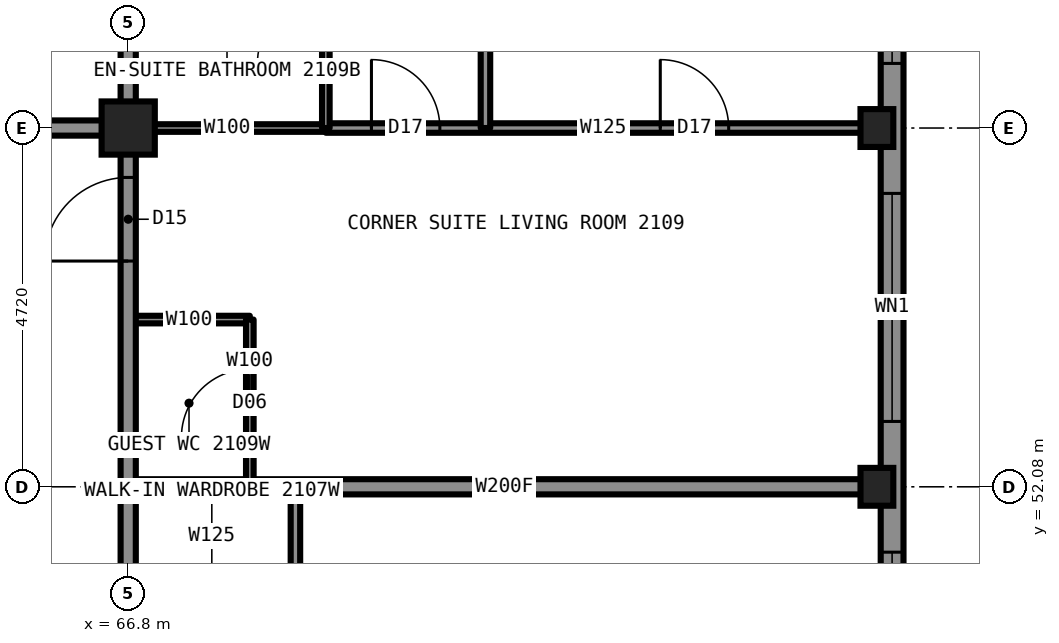
"""IFC4 building model, lengths in metres.
Left out: names, types, materials, properties, quantities, classifications, styles, units other than length and angle.
Written with IfcOpenShell. Run it as: python <this file> out.ifc"""

import sys

from ifc_helpers import new_model, si_unit, direction, frame, frame_2d, origin, origin_2d, place, context, subcontext, project, spatial, rectangle, hollow_rectangle, i_section, extrude, element, fill, save


model = new_model("IFC4")
c1 = context("Model", 3, precision=1e-05, world=origin(), true_north=direction((0.0, 1.0)))
c2 = subcontext(c1, "Body", "Model", "MODEL_VIEW")
j1 = project(units=[si_unit("LENGTHUNIT", "METRE"), si_unit("PLANEANGLEUNIT", "RADIAN")], contexts=[c1])
p1 = place(None, origin())
s1 = spatial("IfcSite", under=j1, at=p1, CompositionType="ELEMENT")
p2 = place(p1, origin())
s2 = spatial("IfcBuilding", under=s1, at=p2, CompositionType="ELEMENT")
p3 = place(p2, frame((0.0, 0.0, 81.0)))
s3 = spatial("IfcBuildingStorey", under=s2, at=p3, CompositionType="ELEMENT", Elevation=81.0)
for number, where, z_axis, x_axis in (
    (1, (76.65, 52.08, 0.0), (0.0, 0.0, 1.0), (1.0, 0.0, 0.0)),
    (2, (76.65, 56.8, 0.0), (0.0, 0.0, 1.0), (1.0, 0.0, 0.0)),
):
    element("IfcColumn", number, at=place(p3, frame(where, z_axis=z_axis, x_axis=x_axis)), inside=s3, PredefinedType="COLUMN", context=c2, shape_type="SweptSolid", body=[
        extrude(i_section(OverallWidth=0.432, OverallDepth=0.498, WebThickness=0.056, FlangeThickness=0.089, at=origin_2d()), origin(), (0.0, 0.0, 1.0), 3.5),
    ])
p4 = place(p3, frame((66.8, 56.8, 0.0), z_axis=(0.0, 0.0, 1.0), x_axis=(1.0, 0.0, 0.0)))
e3 = element("IfcColumn", 3, at=p4, inside=s3, PredefinedType="COLUMN", context=c2, shape_type="SweptSolid", body=[
    extrude(hollow_rectangle(XDim=0.7, YDim=0.7, WallThickness=0.06, at=origin_2d()), origin(), (0.0, 0.0, 1.0), 3.5),
])
p5 = place(p3, frame((66.8, 56.8, 0.0), z_axis=(0.0, 0.0, 1.0), x_axis=(1.0, 0.0, 0.0)))
e4 = element("IfcWall", 4, at=p5, inside=s3, PredefinedType="PARTITIONING", context=c2, shape_type="SweptSolid", body=[
    extrude(rectangle(XDim=2.6, YDim=0.1, at=frame_2d((1.3, 0.0))), origin(), (0.0, 0.0, 1.0), 2.573),
])
p6 = place(p3, frame((43.2, 56.8, 0.0), z_axis=(0.0, 0.0, 1.0), x_axis=(1.0, 0.0, 0.0)))
e5 = element("IfcWall", 5, at=p6, inside=s3, PredefinedType="PARTITIONING", context=c2, shape_type="SweptSolid", body=[
    extrude(rectangle(XDim=23.6, YDim=0.2, at=frame_2d((11.8, 0.0))), origin(), (0.0, 0.0, 1.0), 3.33),
])
p7 = place(p6, frame((0.7, 0.0, 0.0)))
e6 = element("IfcOpeningElement", 6, at=p7, cuts=e5, PredefinedType="OPENING", context=c2, shape_type="SweptSolid", body=[
    extrude(rectangle(XDim=1.0, YDim=2.2, at=frame_2d((0.5, 1.1))), frame((0.0, 0.11, 0.0), z_axis=(0.0, -1.0, 0.0), x_axis=(1.0, 0.0, 0.0)), (0.0, 0.0, 1.0), 0.22),
])
p8 = place(p6, frame((6.98, 0.0, 0.0)))
e7 = element("IfcOpeningElement", 7, at=p8, cuts=e5, PredefinedType="OPENING", context=c2, shape_type="SweptSolid", body=[
    extrude(rectangle(XDim=1.0, YDim=2.2, at=frame_2d((0.5, 1.1))), frame((0.0, 0.11, 0.0), z_axis=(0.0, -1.0, 0.0), x_axis=(1.0, 0.0, 0.0)), (0.0, 0.0, 1.0), 0.22),
])
p9 = place(p6, frame((11.29, 0.0, 0.0)))
e8 = element("IfcOpeningElement", 8, at=p9, cuts=e5, PredefinedType="OPENING", context=c2, shape_type="SweptSolid", body=[
    extrude(rectangle(XDim=1.1, YDim=2.2, at=frame_2d((0.55, 1.1))), frame((0.0, 0.11, 0.0), z_axis=(0.0, -1.0, 0.0), x_axis=(1.0, 0.0, 0.0)), (0.0, 0.0, 1.0), 0.22),
])
p10 = place(p3, frame((69.4, 56.8, 0.0), z_axis=(0.0, 0.0, 1.0), x_axis=(1.0, 0.0, 0.0)))
e9 = element("IfcWall", 9, at=p10, inside=s3, PredefinedType="PARTITIONING", context=c2, shape_type="SweptSolid", body=[
    extrude(rectangle(XDim=7.3, YDim=0.125, at=frame_2d((3.65, 0.0))), origin(), (0.0, 0.0, 1.0), 2.573),
])
p11 = place(p10, frame((0.6, 0.0, 0.0)))
e10 = element("IfcOpeningElement", 10, at=p11, cuts=e9, PredefinedType="OPENING", context=c2, shape_type="SweptSolid", body=[
    extrude(rectangle(XDim=0.9, YDim=2.2, at=frame_2d((0.45, 1.1))), frame((0.0, 0.073, 0.0), z_axis=(0.0, -1.0, 0.0), x_axis=(1.0, 0.0, 0.0)), (0.0, 0.0, 1.0), 0.145),
])
p12 = place(p10, frame((4.4, 0.0, 0.0)))
e11 = element("IfcOpeningElement", 11, at=p12, cuts=e9, PredefinedType="OPENING", context=c2, shape_type="SweptSolid", body=[
    extrude(rectangle(XDim=0.9, YDim=2.2, at=frame_2d((0.45, 1.1))), frame((0.0, 0.073, 0.0), z_axis=(0.0, -1.0, 0.0), x_axis=(1.0, 0.0, 0.0)), (0.0, 0.0, 1.0), 0.145),
])
p13 = place(p3, frame((66.8, 52.08, 0.0), z_axis=(0.0, 0.0, 1.0), x_axis=(1.0, 0.0, 0.0)))
e12 = element("IfcWall", 12, at=p13, inside=s3, PredefinedType="PARTITIONING", context=c2, shape_type="SweptSolid", body=[
    extrude(rectangle(XDim=9.9, YDim=0.2, at=frame_2d((4.95, 0.0))), origin(), (0.0, 0.0, 1.0), 2.573),
])
p14 = place(p3, frame((66.8, 54.28, 0.0), z_axis=(0.0, 0.0, 1.0), x_axis=(1.0, 0.0, 0.0)))
e13 = element("IfcWall", 13, at=p14, inside=s3, PredefinedType="PARTITIONING", context=c2, shape_type="SweptSolid", body=[
    extrude(rectangle(XDim=1.6, YDim=0.1, at=frame_2d((0.8, 0.0))), origin(), (0.0, 0.0, 1.0), 2.723),
])
p15 = place(p3, frame((66.8, 33.2, 0.0), z_axis=(0.0, 0.0, 1.0), x_axis=(0.0, 1.0, 0.0)))
e14 = element("IfcWall", 14, at=p15, inside=s3, PredefinedType="PARTITIONING", context=c2, shape_type="SweptSolid", body=[
    extrude(rectangle(XDim=23.6, YDim=0.2, at=frame_2d((11.8, 0.0))), origin(), (0.0, 0.0, 1.0), 3.33),
])
p16 = place(p15, frame((7.72, 0.0, 0.0)))
e15 = element("IfcOpeningElement", 15, at=p16, cuts=e14, PredefinedType="OPENING", context=c2, shape_type="SweptSolid", body=[
    extrude(rectangle(XDim=1.0, YDim=2.2, at=frame_2d((0.5, 1.1))), frame((0.0, 0.11, 0.0), z_axis=(0.0, -1.0, 0.0), x_axis=(1.0, 0.0, 0.0)), (0.0, 0.0, 1.0), 0.22),
])
p17 = place(p15, frame((16.42, 0.0, 0.0)))
e16 = element("IfcOpeningElement", 16, at=p17, cuts=e14, PredefinedType="OPENING", context=c2, shape_type="SweptSolid", body=[
    extrude(rectangle(XDim=1.0, YDim=2.2, at=frame_2d((0.5, 1.1))), frame((0.0, 0.11, 0.0), z_axis=(0.0, -1.0, 0.0), x_axis=(1.0, 0.0, 0.0)), (0.0, 0.0, 1.0), 0.22),
])
p18 = place(p15, frame((21.85, 0.0, 0.0)))
e17 = element("IfcOpeningElement", 17, at=p18, cuts=e14, PredefinedType="OPENING", context=c2, shape_type="SweptSolid", body=[
    extrude(rectangle(XDim=1.1, YDim=2.2, at=frame_2d((0.55, 1.1))), frame((0.0, 0.11, 0.0), z_axis=(0.0, -1.0, 0.0), x_axis=(1.0, 0.0, 0.0)), (0.0, 0.0, 1.0), 0.22),
])
p19 = place(p15, frame((0.66, 0.0, 0.0)))
e18 = element("IfcOpeningElement", 18, at=p19, cuts=e14, PredefinedType="OPENING", context=c2, shape_type="SweptSolid", body=[
    extrude(rectangle(XDim=1.1, YDim=2.2, at=frame_2d((0.55, 1.1))), frame((0.0, 0.11, 0.0), z_axis=(0.0, -1.0, 0.0), x_axis=(1.0, 0.0, 0.0)), (0.0, 0.0, 1.0), 0.22),
])
p20 = place(p3, frame((66.8, 56.8, 0.0), z_axis=(0.0, 0.0, 1.0), x_axis=(0.0, 1.0, 0.0)))
e19 = element("IfcWall", 19, at=p20, inside=s3, PredefinedType="PARTITIONING", context=c2, shape_type="SweptSolid", body=[
    extrude(rectangle(XDim=9.9, YDim=0.2, at=frame_2d((4.95, 0.0))), origin(), (0.0, 0.0, 1.0), 2.573),
])
p21 = place(p3, frame((68.4, 52.08, 0.0), z_axis=(0.0, 0.0, 1.0), x_axis=(0.0, 1.0, 0.0)))
e20 = element("IfcWall", 20, at=p21, inside=s3, PredefinedType="PARTITIONING", context=c2, shape_type="SweptSolid", body=[
    extrude(rectangle(XDim=2.2, YDim=0.1, at=frame_2d((1.1, 0.0))), origin(), (0.0, 0.0, 1.0), 3.33),
])
p22 = place(p21, frame((0.65, 0.0, 0.0)))
e21 = element("IfcOpeningElement", 21, at=p22, cuts=e20, PredefinedType="OPENING", context=c2, shape_type="SweptSolid", body=[
    extrude(rectangle(XDim=0.9, YDim=2.1, at=frame_2d((0.45, 1.05))), frame((0.0, 0.06, 0.0), z_axis=(0.0, -1.0, 0.0), x_axis=(1.0, 0.0, 0.0)), (0.0, 0.0, 1.0), 0.12),
])
p23 = place(p3, frame((69.0, 50.88, 0.0), z_axis=(0.0, 0.0, 1.0), x_axis=(0.0, 1.0, 0.0)))
e22 = element("IfcWall", 22, at=p23, inside=s3, PredefinedType="PARTITIONING", context=c2, shape_type="SweptSolid", body=[
    extrude(rectangle(XDim=1.2, YDim=0.125, at=frame_2d((0.6, 0.0))), origin(), (0.0, 0.0, 1.0), 3.33),
])
p24 = place(p3, frame((69.4, 56.8, 0.0), z_axis=(0.0, 0.0, 1.0), x_axis=(0.0, 1.0, 0.0)))
e23 = element("IfcWall", 23, at=p24, inside=s3, PredefinedType="PARTITIONING", context=c2, shape_type="SweptSolid", body=[
    extrude(rectangle(XDim=2.6, YDim=0.1, at=frame_2d((1.3, 0.0))), origin(), (0.0, 0.0, 1.0), 3.33),
])
p25 = place(p24, frame((0.85, 0.0, 0.0)))
e24 = element("IfcOpeningElement", 24, at=p25, cuts=e23, PredefinedType="OPENING", context=c2, shape_type="SweptSolid", body=[
    extrude(rectangle(XDim=0.9, YDim=2.1, at=frame_2d((0.45, 1.05))), frame((0.0, 0.06, 0.0), z_axis=(0.0, -1.0, 0.0), x_axis=(1.0, 0.0, 0.0)), (0.0, 0.0, 1.0), 0.12),
])
p26 = place(p3, frame((71.5, 56.8, 0.0), z_axis=(0.0, 0.0, 1.0), x_axis=(0.0, 1.0, 0.0)))
e25 = element("IfcWall", 25, at=p26, inside=s3, PredefinedType="PARTITIONING", context=c2, shape_type="SweptSolid", body=[
    extrude(rectangle(XDim=9.894, YDim=0.125, at=frame_2d((4.947, 0.0))), origin(), (0.0, 0.0, 1.0), 3.33),
])
p27 = place(p3, frame((76.85, 28.5, 0.0), z_axis=(0.0, 0.0, 1.0), x_axis=(0.0, 1.0, 0.0)))
e26 = element("IfcWall", 26, at=p27, inside=s3, PredefinedType="SOLIDWALL", context=c2, shape_type="SweptSolid", body=[
    extrude(rectangle(XDim=33.0, YDim=0.3, at=frame_2d((16.5, 0.0))), origin(), (0.0, 0.0, 1.0), 2.63),
])
p28 = place(p27, frame((0.85, 0.0, 0.5)))
e27 = element("IfcOpeningElement", 27, at=p28, cuts=e26, PredefinedType="OPENING", context=c2, shape_type="SweptSolid", body=[
    extrude(rectangle(XDim=3.0, YDim=2.0, at=frame_2d((1.5, 1.0))), frame((0.0, 0.16, 0.0), z_axis=(0.0, -1.0, 0.0), x_axis=(1.0, 0.0, 0.0)), (0.0, 0.0, 1.0), 0.32),
])
p29 = place(p27, frame((5.56, 0.0, 0.5)))
e28 = element("IfcOpeningElement", 28, at=p29, cuts=e26, PredefinedType="OPENING", context=c2, shape_type="SweptSolid", body=[
    extrude(rectangle(XDim=3.0, YDim=2.0, at=frame_2d((1.5, 1.0))), frame((0.0, 0.16, 0.0), z_axis=(0.0, -1.0, 0.0), x_axis=(1.0, 0.0, 0.0)), (0.0, 0.0, 1.0), 0.32),
])
p30 = place(p27, frame((10.28, 0.0, 0.5)))
e29 = element("IfcOpeningElement", 29, at=p30, cuts=e26, PredefinedType="OPENING", context=c2, shape_type="SweptSolid", body=[
    extrude(rectangle(XDim=3.0, YDim=2.0, at=frame_2d((1.5, 1.0))), frame((0.0, 0.16, 0.0), z_axis=(0.0, -1.0, 0.0), x_axis=(1.0, 0.0, 0.0)), (0.0, 0.0, 1.0), 0.32),
])
p31 = place(p27, frame((15.0, 0.0, 0.5)))
e30 = element("IfcOpeningElement", 30, at=p31, cuts=e26, PredefinedType="OPENING", context=c2, shape_type="SweptSolid", body=[
    extrude(rectangle(XDim=3.0, YDim=2.0, at=frame_2d((1.5, 1.0))), frame((0.0, 0.16, 0.0), z_axis=(0.0, -1.0, 0.0), x_axis=(1.0, 0.0, 0.0)), (0.0, 0.0, 1.0), 0.32),
])
p32 = place(p27, frame((19.72, 0.0, 0.5)))
e31 = element("IfcOpeningElement", 31, at=p32, cuts=e26, PredefinedType="OPENING", context=c2, shape_type="SweptSolid", body=[
    extrude(rectangle(XDim=3.0, YDim=2.0, at=frame_2d((1.5, 1.0))), frame((0.0, 0.16, 0.0), z_axis=(0.0, -1.0, 0.0), x_axis=(1.0, 0.0, 0.0)), (0.0, 0.0, 1.0), 0.32),
])
p33 = place(p27, frame((24.44, 0.0, 0.5)))
e32 = element("IfcOpeningElement", 32, at=p33, cuts=e26, PredefinedType="OPENING", context=c2, shape_type="SweptSolid", body=[
    extrude(rectangle(XDim=3.0, YDim=2.0, at=frame_2d((1.5, 1.0))), frame((0.0, 0.16, 0.0), z_axis=(0.0, -1.0, 0.0), x_axis=(1.0, 0.0, 0.0)), (0.0, 0.0, 1.0), 0.32),
])
p34 = place(p27, frame((29.15, 0.0, 0.5)))
e33 = element("IfcOpeningElement", 33, at=p34, cuts=e26, PredefinedType="OPENING", context=c2, shape_type="SweptSolid", body=[
    extrude(rectangle(XDim=3.0, YDim=2.0, at=frame_2d((1.5, 1.0))), frame((0.0, 0.16, 0.0), z_axis=(0.0, -1.0, 0.0), x_axis=(1.0, 0.0, 0.0)), (0.0, 0.0, 1.0), 0.32),
])
p35 = place(p18, origin())
e34 = element("IfcDoor", 34, at=p35, inside=s3, OperationType="SINGLE_SWING_LEFT", PredefinedType="DOOR", context=c2, shape_type="SweptSolid", body=[
    extrude(rectangle(XDim=1.1, YDim=2.2, at=frame_2d((0.55, 1.1))), frame((0.0, 0.025, 0.0), z_axis=(0.0, -1.0, 0.0), x_axis=(1.0, 0.0, 0.0)), (0.0, 0.0, 1.0), 0.05),
])
fill(e17, e34)
p36 = place(p25, origin())
e35 = element("IfcDoor", 35, at=p36, inside=s3, OperationType="SINGLE_SWING_RIGHT", PredefinedType="DOOR", context=c2, shape_type="SweptSolid", body=[
    extrude(rectangle(XDim=0.9, YDim=2.1, at=frame_2d((0.45, 1.05))), frame((0.0, 0.025, 0.0), z_axis=(0.0, -1.0, 0.0), x_axis=(1.0, 0.0, 0.0)), (0.0, 0.0, 1.0), 0.05),
])
fill(e24, e35)
p37 = place(p11, origin())
e36 = element("IfcDoor", 36, at=p37, inside=s3, OperationType="SINGLE_SWING_LEFT", PredefinedType="DOOR", context=c2, shape_type="SweptSolid", body=[
    extrude(rectangle(XDim=0.9, YDim=2.2, at=frame_2d((0.45, 1.1))), frame((0.0, 0.025, 0.0), z_axis=(0.0, -1.0, 0.0), x_axis=(1.0, 0.0, 0.0)), (0.0, 0.0, 1.0), 0.05),
])
fill(e10, e36)
p38 = place(p12, origin())
e37 = element("IfcDoor", 37, at=p38, inside=s3, OperationType="SINGLE_SWING_LEFT", PredefinedType="DOOR", context=c2, shape_type="SweptSolid", body=[
    extrude(rectangle(XDim=0.9, YDim=2.2, at=frame_2d((0.45, 1.1))), frame((0.0, 0.025, 0.0), z_axis=(0.0, -1.0, 0.0), x_axis=(1.0, 0.0, 0.0)), (0.0, 0.0, 1.0), 0.05),
])
fill(e11, e37)
p39 = place(p22, origin())
e38 = element("IfcDoor", 38, at=p39, inside=s3, OperationType="SINGLE_SWING_LEFT", PredefinedType="DOOR", context=c2, shape_type="SweptSolid", body=[
    extrude(rectangle(XDim=0.9, YDim=2.1, at=frame_2d((0.45, 1.05))), frame((0.0, 0.025, 0.0), z_axis=(0.0, -1.0, 0.0), x_axis=(1.0, 0.0, 0.0)), (0.0, 0.0, 1.0), 0.05),
])
fill(e21, e38)
p40 = place(p32, origin())
e39 = element("IfcWindow", 39, at=p40, inside=s3, PartitioningType="SINGLE_PANEL", PredefinedType="WINDOW", context=c2, shape_type="SweptSolid", body=[
    extrude(rectangle(XDim=3.0, YDim=2.0, at=frame_2d((1.5, 1.0))), frame((0.0, 0.03, 0.0), z_axis=(0.0, -1.0, 0.0), x_axis=(1.0, 0.0, 0.0)), (0.0, 0.0, 1.0), 0.06),
])
fill(e31, e39)
p41 = place(p33, origin())
e40 = element("IfcWindow", 40, at=p41, inside=s3, PartitioningType="SINGLE_PANEL", PredefinedType="WINDOW", context=c2, shape_type="SweptSolid", body=[
    extrude(rectangle(XDim=3.0, YDim=2.0, at=frame_2d((1.5, 1.0))), frame((0.0, 0.03, 0.0), z_axis=(0.0, -1.0, 0.0), x_axis=(1.0, 0.0, 0.0)), (0.0, 0.0, 1.0), 0.06),
])
fill(e32, e40)
p42 = place(p34, origin())
e41 = element("IfcWindow", 41, at=p42, inside=s3, PartitioningType="SINGLE_PANEL", PredefinedType="WINDOW", context=c2, shape_type="SweptSolid", body=[
    extrude(rectangle(XDim=3.0, YDim=2.0, at=frame_2d((1.5, 1.0))), frame((0.0, 0.03, 0.0), z_axis=(0.0, -1.0, 0.0), x_axis=(1.0, 0.0, 0.0)), (0.0, 0.0, 1.0), 0.06),
])
fill(e33, e41)
save(model, sys.argv[1])
